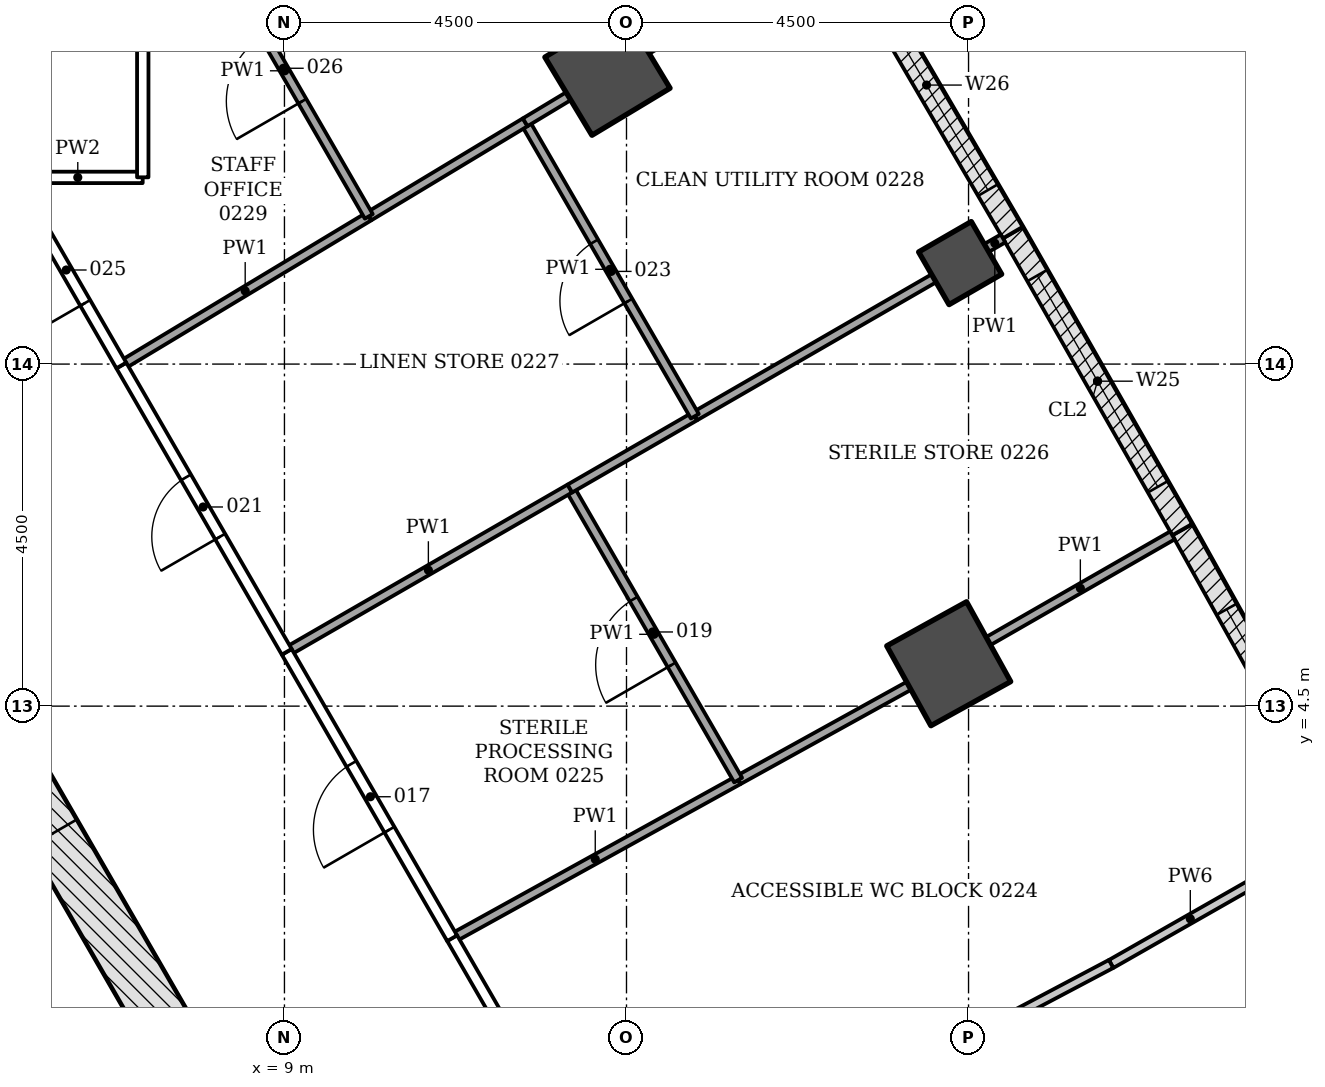
"""IFC4 building model, lengths in metres.
Left out: names, types, materials, properties, quantities, classifications, styles, units other than length and angle.
Written with IfcOpenShell. Run it as: python <this file> out.ifc"""

import sys

from ifc_helpers import new_model, si_unit, direction, frame, frame_2d, origin, origin_2d, place, context, subcontext, project, spatial, rectangle, extrude, element, fill, save


model = new_model("IFC4")
c1 = context("Model", 3, precision=1e-05, world=origin(), true_north=direction((0.0, 1.0)))
c2 = subcontext(c1, "Body", "Model", "MODEL_VIEW")
j1 = project(units=[si_unit("LENGTHUNIT", "METRE"), si_unit("PLANEANGLEUNIT", "RADIAN")], contexts=[c1])
p1 = place(None, origin())
s1 = spatial("IfcSite", under=j1, at=p1, CompositionType="ELEMENT")
p2 = place(p1, origin())
s2 = spatial("IfcBuilding", under=s1, at=p2, CompositionType="ELEMENT")
p3 = place(p2, frame((0.0, 0.0, 10.5)))
s3 = spatial("IfcBuildingStorey", under=s2, at=p3, CompositionType="ELEMENT", Elevation=10.5)
for number, where, z_axis, x_axis in (
    (1, (17.739, 5.058, -0.25), (0.0, 0.0, 1.0), (0.875, 0.484, 0.0)),
    (2, (13.25, 12.834, -0.25), (0.0, 0.0, 1.0), (0.857, 0.516, 0.0)),
):
    element("IfcColumn", number, at=place(p3, frame(where, z_axis=z_axis, x_axis=x_axis)), inside=s3, PredefinedType="COLUMN", context=c2, shape_type="SweptSolid", body=[
        extrude(rectangle(XDim=1.2, YDim=1.2, at=origin_2d()), origin(), (0.0, 0.0, 1.0), 4.5),
    ])
p4 = place(p3, frame((17.89, 10.329, -0.25), z_axis=(0.0, 0.0, 1.0), x_axis=(0.866025403784, 0.5, 0.0)))
e3 = element("IfcColumn", 3, at=p4, inside=s3, PredefinedType="COLUMN", context=c2, shape_type="SweptSolid", body=[
    extrude(rectangle(XDim=0.8, YDim=0.8, at=origin_2d()), origin(), (0.0, 0.0, 1.0), 4.5),
])
p5 = place(p3, frame((10.311, -4.703, -0.25), z_axis=(0.0, 0.0, 1.0), x_axis=(-0.500001446645, 0.866024568562, 0.0)))
e4 = element("IfcWall", 4, at=p5, inside=s3, PredefinedType="SHEAR", context=c2, shape_type="SweptSolid", body=[
    extrude(rectangle(XDim=18.458, YDim=0.7, at=frame_2d((9.229, 0.0))), origin(), (0.0, 0.0, 1.0), 4.5),
])
p6 = place(p5, frame((8.7, 0.0, 0.25)))
e5 = element("IfcOpeningElement", 5, at=p6, cuts=e4, PredefinedType="OPENING", context=c2, shape_type="SweptSolid", body=[
    extrude(rectangle(XDim=1.0, YDim=2.1, at=frame_2d((0.5, 1.05))), frame((0.0, 0.36, 0.0), z_axis=(0.0, -1.0, 0.0), x_axis=(1.0, 0.0, 0.0)), (0.0, 0.0, 1.0), 0.72),
])
p7 = place(p5, frame((4.002, 0.0, 0.25)))
e6 = element("IfcOpeningElement", 6, at=p7, cuts=e4, PredefinedType="OPENING", context=c2, shape_type="SweptSolid", body=[
    extrude(rectangle(XDim=0.9, YDim=2.1, at=frame_2d((0.45, 1.05))), frame((0.0, 0.36, 0.0), z_axis=(0.0, -1.0, 0.0), x_axis=(1.0, 0.0, 0.0)), (0.0, 0.0, 1.0), 0.72),
])
p8 = place(p5, frame((14.093, 0.0, 0.25)))
e7 = element("IfcOpeningElement", 7, at=p8, cuts=e4, PredefinedType="OPENING", context=c2, shape_type="SweptSolid", body=[
    extrude(rectangle(XDim=0.9, YDim=2.1, at=frame_2d((0.45, 1.05))), frame((0.0, 0.36, 0.0), z_axis=(0.0, -1.0, 0.0), x_axis=(1.0, 0.0, 0.0)), (0.0, 0.0, 1.0), 0.72),
])
p9 = place(p3, frame((20.812, 6.82, 0.0), z_axis=(0.0, 0.0, 1.0), x_axis=(0.486606252415, -0.873621402617, 0.0)))
e8 = element("IfcWall", 8, at=p9, inside=s3, PredefinedType="NOTDEFINED", context=c2, shape_type="SweptSolid", body=[
    extrude(rectangle(XDim=4.496, YDim=0.3, at=frame_2d((2.248, 0.0))), origin(), (0.0, 0.0, 1.0), 4.25),
])
p10 = place(p9, frame((1.198, 0.0, 0.8)))
e9 = element("IfcOpeningElement", 9, at=p10, cuts=e8, PredefinedType="OPENING", context=c2, shape_type="SweptSolid", body=[
    extrude(rectangle(XDim=2.1, YDim=3.0, at=frame_2d((1.05, 1.5))), frame((0.0, 0.16, 0.0), z_axis=(0.0, -1.0, 0.0), x_axis=(1.0, 0.0, 0.0)), (0.0, 0.0, 1.0), 0.32),
])
p11 = place(p3, frame((18.583, 10.728, 0.0), z_axis=(0.0, 0.0, 1.0), x_axis=(0.495524760411, -0.868593812907, 0.0)))
e10 = element("IfcWall", 10, at=p11, inside=s3, PredefinedType="NOTDEFINED", context=c2, shape_type="SweptSolid", body=[
    extrude(rectangle(XDim=4.496, YDim=0.3, at=frame_2d((2.248, 0.0))), origin(), (0.0, 0.0, 1.0), 4.25),
])
p12 = place(p11, frame((0.648, 0.0, 0.8)))
e11 = element("IfcOpeningElement", 11, at=p12, cuts=e10, PredefinedType="OPENING", context=c2, shape_type="SweptSolid", body=[
    extrude(rectangle(XDim=3.2, YDim=2.7, at=frame_2d((1.6, 1.35))), frame((0.0, 0.16, 0.0), z_axis=(0.0, -1.0, 0.0), x_axis=(1.0, 0.0, 0.0)), (0.0, 0.0, 1.0), 0.32),
])
p13 = place(p3, frame((16.314, 14.612, 0.0), z_axis=(0.0, 0.0, 1.0), x_axis=(0.50445499627, -0.86343798662, 0.0)))
e12 = element("IfcWall", 12, at=p13, inside=s3, PredefinedType="NOTDEFINED", context=c2, shape_type="SweptSolid", body=[
    extrude(rectangle(XDim=4.496, YDim=0.3, at=frame_2d((2.248, 0.0))), origin(), (0.0, 0.0, 1.0), 4.25),
])
p14 = place(p13, frame((0.648, 0.0, 0.8)))
e13 = element("IfcOpeningElement", 13, at=p14, cuts=e12, PredefinedType="OPENING", context=c2, shape_type="SweptSolid", body=[
    extrude(rectangle(XDim=3.2, YDim=2.7, at=frame_2d((1.6, 1.35))), frame((0.0, 0.16, 0.0), z_axis=(0.0, -1.0, 0.0), x_axis=(1.0, 0.0, 0.0)), (0.0, 0.0, 1.0), 0.32),
])
p15 = place(p3, frame((21.959, 2.295, 0.0), z_axis=(0.0, 0.0, 1.0), x_axis=(-0.868831589773, -0.49510773435, 0.0)))
e14 = element("IfcWall", 14, at=p15, inside=s3, PredefinedType="PARTITIONING", context=c2, shape_type="SweptSolid", body=[
    extrude(rectangle(XDim=2.397, YDim=0.12, at=frame_2d((1.199, 0.0))), origin(), (0.0, 0.0, 1.0), 3.638),
])
p16 = place(p3, frame((19.875, 1.108, 0.0), z_axis=(0.0, 0.0, 1.0), x_axis=(-0.884045895877, -0.467400100538, 0.0)))
e15 = element("IfcWall", 15, at=p16, inside=s3, PredefinedType="PARTITIONING", context=c2, shape_type="SweptSolid", body=[
    extrude(rectangle(XDim=2.439, YDim=0.12, at=frame_2d((1.219, 0.0))), origin(), (0.0, 0.0, 1.0), 3.638),
])
p17 = place(p3, frame((11.205, 1.45, 0.0), z_axis=(0.0, 0.0, 1.0), x_axis=(0.500058412813, -0.865991676505, 0.0)))
e16 = element("IfcWall", 16, at=p17, inside=s3, PredefinedType="PARTITIONING", context=c2, shape_type="SweptSolid", body=[
    extrude(rectangle(XDim=4.361, YDim=0.15, at=frame_2d((2.181, 0.0))), origin(), (0.0, 0.0, 1.0), 3.638),
])
p18 = place(p17, frame((1.65, 0.0, 0.0)))
e17 = element("IfcOpeningElement", 17, at=p18, cuts=e16, PredefinedType="OPENING", context=c2, shape_type="SweptSolid", body=[
    extrude(rectangle(XDim=1.0, YDim=2.1, at=frame_2d((0.5, 1.05))), frame((0.0, 0.085, 0.0), z_axis=(0.0, -1.0, 0.0), x_axis=(1.0, 0.0, 0.0)), (0.0, 0.0, 1.0), 0.17),
])
p19 = place(p3, frame((14.97, 3.526, 0.0), z_axis=(0.0, 0.0, 1.0), x_axis=(-0.875157368867, -0.483838381815, 0.0)))
e18 = element("IfcWall", 18, at=p19, inside=s3, PredefinedType="PARTITIONING", context=c2, shape_type="SweptSolid", body=[
    extrude(rectangle(XDim=4.299, YDim=0.12, at=frame_2d((2.149, 0.0))), origin(), (0.0, 0.0, 1.0), 3.638),
])
p20 = place(p3, frame((17.214, 4.767, 0.0), z_axis=(0.0, 0.0, 1.0), x_axis=(-0.875184225923, -0.483789800116, 0.0)))
e19 = element("IfcWall", 19, at=p20, inside=s3, PredefinedType="PARTITIONING", context=c2, shape_type="SweptSolid", body=[
    extrude(rectangle(XDim=2.563, YDim=0.12, at=frame_2d((1.281, 0.0))), origin(), (0.0, 0.0, 1.0), 3.638),
])
p21 = place(p3, frame((20.682, 6.746, 0.0), z_axis=(0.0, 0.0, 1.0), x_axis=(-0.867283853893, -0.49781393791, 0.0)))
e20 = element("IfcWall", 20, at=p21, inside=s3, PredefinedType="PARTITIONING", context=c2, shape_type="SweptSolid", body=[
    extrude(rectangle(XDim=2.792, YDim=0.12, at=frame_2d((1.396, 0.0))), origin(), (0.0, 0.0, 1.0), 3.633),
])
p22 = place(p3, frame((11.206, 1.446, 0.0), z_axis=(0.0, 0.0, 1.0), x_axis=(-0.500044734646, 0.865999574684, 0.0)))
e21 = element("IfcWall", 21, at=p22, inside=s3, PredefinedType="PARTITIONING", context=c2, shape_type="SweptSolid", body=[
    extrude(rectangle(XDim=4.35, YDim=0.15, at=frame_2d((2.175, 0.0))), origin(), (0.0, 0.0, 1.0), 3.638),
])
p23 = place(p22, frame((1.65, 0.0, 0.0)))
e22 = element("IfcOpeningElement", 22, at=p23, cuts=e21, PredefinedType="OPENING", context=c2, shape_type="SweptSolid", body=[
    extrude(rectangle(XDim=1.0, YDim=2.1, at=frame_2d((0.5, 1.05))), frame((0.0, 0.085, 0.0), z_axis=(0.0, -1.0, 0.0), x_axis=(1.0, 0.0, 0.0)), (0.0, 0.0, 1.0), 0.17),
])
p24 = place(p3, frame((9.03, 5.215, 0.0), z_axis=(0.0, 0.0, 1.0), x_axis=(-0.500239242508, 0.86588723299, 0.0)))
e23 = element("IfcWall", 23, at=p24, inside=s3, PredefinedType="PARTITIONING", context=c2, shape_type="SweptSolid", body=[
    extrude(rectangle(XDim=4.348, YDim=0.15, at=frame_2d((2.174, 0.0))), origin(), (0.0, 0.0, 1.0), 3.638),
])
p25 = place(p24, frame((1.75, 0.0, 0.0)))
e24 = element("IfcOpeningElement", 24, at=p25, cuts=e23, PredefinedType="OPENING", context=c2, shape_type="SweptSolid", body=[
    extrude(rectangle(XDim=0.9, YDim=2.1, at=frame_2d((0.45, 1.05))), frame((0.0, 0.085, 0.0), z_axis=(0.0, -1.0, 0.0), x_axis=(1.0, 0.0, 0.0)), (0.0, 0.0, 1.0), 0.17),
])
p26 = place(p3, frame((6.854, 8.982, 0.0), z_axis=(0.0, 0.0, 1.0), x_axis=(-0.499919889281, 0.866071650789, 0.0)))
e25 = element("IfcWall", 25, at=p26, inside=s3, PredefinedType="PARTITIONING", context=c2, shape_type="SweptSolid", body=[
    extrude(rectangle(XDim=2.854, YDim=0.15, at=frame_2d((1.427, 0.0))), origin(), (0.0, 0.0, 1.0), 3.638),
])
p27 = place(p26, frame((0.95, 0.0, 0.0)))
e26 = element("IfcOpeningElement", 26, at=p27, cuts=e25, PredefinedType="OPENING", context=c2, shape_type="SweptSolid", body=[
    extrude(rectangle(XDim=1.0, YDim=2.1, at=frame_2d((0.5, 1.05))), frame((0.0, 0.085, 0.0), z_axis=(0.0, -1.0, 0.0), x_axis=(1.0, 0.0, 0.0)), (0.0, 0.0, 1.0), 0.17),
])
p28 = place(p3, frame((5.427, 11.456, 0.0), z_axis=(0.0, 0.0, 1.0), x_axis=(1.0, 0.0, 0.0)))
e27 = element("IfcWall", 27, at=p28, inside=s3, PredefinedType="PARTITIONING", context=c2, shape_type="SweptSolid", body=[
    extrude(rectangle(XDim=1.708, YDim=0.15, at=frame_2d((0.854, 0.0))), origin(), (0.0, 0.0, 1.0), 4.25),
])
p29 = place(p3, frame((7.136, 11.457, 0.0), z_axis=(0.0, 0.0, 1.0), x_axis=(0.0, 1.0, 0.0)))
e28 = element("IfcWall", 28, at=p29, inside=s3, PredefinedType="PARTITIONING", context=c2, shape_type="SweptSolid", body=[
    extrude(rectangle(XDim=2.84, YDim=0.15, at=frame_2d((1.42, 0.0))), origin(), (0.0, 0.0, 1.0), 3.638),
])
p30 = place(p3, frame((14.969, 3.527, 0.0), z_axis=(0.0, 0.0, 1.0), x_axis=(-0.499903777033, 0.866080951013, 0.0)))
e29 = element("IfcWall", 29, at=p30, inside=s3, PredefinedType="PARTITIONING", context=c2, shape_type="SweptSolid", body=[
    extrude(rectangle(XDim=4.429, YDim=0.12, at=frame_2d((2.214, 0.0))), origin(), (0.0, 0.0, 1.0), 3.638),
])
p31 = place(p30, frame((1.75, 0.0, 0.0)))
e30 = element("IfcOpeningElement", 30, at=p31, cuts=e29, PredefinedType="OPENING", context=c2, shape_type="SweptSolid", body=[
    extrude(rectangle(XDim=1.0, YDim=2.1, at=frame_2d((0.5, 1.05))), frame((0.0, 0.07, 0.0), z_axis=(0.0, -1.0, 0.0), x_axis=(1.0, 0.0, 0.0)), (0.0, 0.0, 1.0), 0.14),
])
p32 = place(p3, frame((12.755, 7.363, 0.0), z_axis=(0.0, 0.0, 1.0), x_axis=(-0.866173292352, -0.499743761959, 0.0)))
e31 = element("IfcWall", 31, at=p32, inside=s3, PredefinedType="PARTITIONING", context=c2, shape_type="SweptSolid", body=[
    extrude(rectangle(XDim=4.298, YDim=0.12, at=frame_2d((2.149, 0.0))), origin(), (0.0, 0.0, 1.0), 3.638),
])
p33 = place(p3, frame((14.4, 8.313, 0.0), z_axis=(0.0, 0.0, 1.0), x_axis=(-0.865980106173, -0.500078449558, 0.0)))
e32 = element("IfcWall", 32, at=p33, inside=s3, PredefinedType="PARTITIONING", context=c2, shape_type="SweptSolid", body=[
    extrude(rectangle(XDim=1.9, YDim=0.12, at=frame_2d((0.95, 0.0))), origin(), (0.0, 0.0, 1.0), 3.638),
])
p34 = place(p3, frame((17.543, 10.128, 0.0), z_axis=(0.0, 0.0, 1.0), x_axis=(-0.866039913117, -0.499974868256, 0.0)))
e33 = element("IfcWall", 33, at=p34, inside=s3, PredefinedType="PARTITIONING", context=c2, shape_type="SweptSolid", body=[
    extrude(rectangle(XDim=3.628, YDim=0.12, at=frame_2d((1.814, 0.0))), origin(), (0.0, 0.0, 1.0), 3.638),
])
p35 = place(p3, frame((18.454, 10.653, 0.0), z_axis=(0.0, 0.0, 1.0), x_axis=(-0.866558586415, -0.499075361355, 0.0)))
e34 = element("IfcWall", 34, at=p35, inside=s3, PredefinedType="PARTITIONING", context=c2, shape_type="SweptSolid", body=[
    extrude(rectangle(XDim=0.25, YDim=0.12, at=frame_2d((0.125, 0.0))), origin(), (0.0, 0.0, 1.0), 4.25),
])
p36 = place(p3, frame((14.399, 8.314, 0.0), z_axis=(0.0, 0.0, 1.0), x_axis=(-0.49998599166, 0.866033491352, 0.0)))
e35 = element("IfcWall", 35, at=p36, inside=s3, PredefinedType="PARTITIONING", context=c2, shape_type="SweptSolid", body=[
    extrude(rectangle(XDim=4.464, YDim=0.12, at=frame_2d((2.232, 0.0))), origin(), (0.0, 0.0, 1.0), 3.638),
])
p37 = place(p36, frame((1.75, 0.0, 0.0)))
e36 = element("IfcOpeningElement", 36, at=p37, cuts=e35, PredefinedType="OPENING", context=c2, shape_type="SweptSolid", body=[
    extrude(rectangle(XDim=0.9, YDim=2.1, at=frame_2d((0.45, 1.05))), frame((0.0, 0.07, 0.0), z_axis=(0.0, -1.0, 0.0), x_axis=(1.0, 0.0, 0.0)), (0.0, 0.0, 1.0), 0.14),
])
p38 = place(p3, frame((10.111, 10.942, 0.0), z_axis=(0.0, 0.0, 1.0), x_axis=(-0.856692501001, -0.515827450539, 0.0)))
e37 = element("IfcWall", 37, at=p38, inside=s3, PredefinedType="PARTITIONING", context=c2, shape_type="SweptSolid", body=[
    extrude(rectangle(XDim=3.8, YDim=0.12, at=frame_2d((1.9, 0.0))), origin(), (0.0, 0.0, 1.0), 3.638),
])
p39 = place(p3, frame((12.167, 12.181, 0.0), z_axis=(0.0, 0.0, 1.0), x_axis=(-0.856602650019, -0.515976646739, 0.0)))
e38 = element("IfcWall", 38, at=p39, inside=s3, PredefinedType="PARTITIONING", context=c2, shape_type="SweptSolid", body=[
    extrude(rectangle(XDim=2.399, YDim=0.12, at=frame_2d((1.199, 0.0))), origin(), (0.0, 0.0, 1.0), 3.638),
])
p40 = place(p3, frame((12.736, 12.524, 0.0), z_axis=(0.0, 0.0, 1.0), x_axis=(-0.856453764076, -0.516223740252, 0.0)))
e39 = element("IfcWall", 39, at=p40, inside=s3, PredefinedType="PARTITIONING", context=c2, shape_type="SweptSolid", body=[
    extrude(rectangle(XDim=0.665, YDim=0.12, at=frame_2d((0.332, 0.0))), origin(), (0.0, 0.0, 1.0), 3.638),
])
p41 = place(p3, frame((16.183, 14.538, 0.0), z_axis=(0.0, 0.0, 1.0), x_axis=(-0.864576979504, -0.50250039454, 0.0)))
e40 = element("IfcWall", 40, at=p41, inside=s3, PredefinedType="PARTITIONING", context=c2, shape_type="SweptSolid", body=[
    extrude(rectangle(XDim=2.792, YDim=0.12, at=frame_2d((1.396, 0.0))), origin(), (0.0, 0.0, 1.0), 3.633),
])
p42 = place(p3, frame((10.11, 10.943, 0.0), z_axis=(0.0, 0.0, 1.0), x_axis=(-0.49990879683, 0.866078053556, 0.0)))
e41 = element("IfcWall", 41, at=p42, inside=s3, PredefinedType="PARTITIONING", context=c2, shape_type="SweptSolid", body=[
    extrude(rectangle(XDim=4.423, YDim=0.12, at=frame_2d((2.211, 0.0))), origin(), (0.0, 0.0, 1.0), 3.638),
])
p43 = place(p42, frame((1.75, 0.0, 0.0)))
e42 = element("IfcOpeningElement", 42, at=p43, cuts=e41, PredefinedType="OPENING", context=c2, shape_type="SweptSolid", body=[
    extrude(rectangle(XDim=1.0, YDim=2.1, at=frame_2d((0.5, 1.05))), frame((0.0, 0.07, 0.0), z_axis=(0.0, -1.0, 0.0), x_axis=(1.0, 0.0, 0.0)), (0.0, 0.0, 1.0), 0.14),
])
p44 = place(p10, origin())
e43 = element("IfcWindow", 43, at=p44, inside=s3, PartitioningType="DOUBLE_PANEL_HORIZONTAL", PredefinedType="WINDOW", context=c2, shape_type="SweptSolid", body=[
    extrude(rectangle(XDim=2.1, YDim=3.0, at=frame_2d((1.05, 1.5))), frame((0.0, 0.03, 0.0), z_axis=(0.0, -1.0, 0.0), x_axis=(1.0, 0.0, 0.0)), (0.0, 0.0, 1.0), 0.06),
])
fill(e9, e43)
p45 = place(p12, origin())
e44 = element("IfcWindow", 44, at=p45, inside=s3, PartitioningType="TRIPLE_PANEL_VERTICAL", PredefinedType="WINDOW", context=c2, shape_type="SweptSolid", body=[
    extrude(rectangle(XDim=3.2, YDim=2.7, at=frame_2d((1.6, 1.35))), frame((0.0, 0.03, 0.0), z_axis=(0.0, -1.0, 0.0), x_axis=(1.0, 0.0, 0.0)), (0.0, 0.0, 1.0), 0.06),
])
fill(e11, e44)
p46 = place(p14, origin())
e45 = element("IfcWindow", 45, at=p46, inside=s3, PartitioningType="TRIPLE_PANEL_VERTICAL", PredefinedType="WINDOW", context=c2, shape_type="SweptSolid", body=[
    extrude(rectangle(XDim=3.2, YDim=2.7, at=frame_2d((1.6, 1.35))), frame((0.0, 0.03, 0.0), z_axis=(0.0, -1.0, 0.0), x_axis=(1.0, 0.0, 0.0)), (0.0, 0.0, 1.0), 0.06),
])
fill(e13, e45)
p47 = place(p6, origin())
e46 = element("IfcDoor", 46, at=p47, inside=s3, OperationType="SINGLE_SWING_LEFT", PredefinedType="DOOR", context=c2, shape_type="SweptSolid", body=[
    extrude(rectangle(XDim=1.0, YDim=2.1, at=frame_2d((0.5, 1.05))), frame((0.0, 0.075, 0.0), z_axis=(0.0, -1.0, 0.0), x_axis=(1.0, 0.0, 0.0)), (0.0, 0.0, 1.0), 0.15),
])
fill(e5, e46)
p48 = place(p23, origin())
e47 = element("IfcDoor", 47, at=p48, inside=s3, OperationType="SINGLE_SWING_RIGHT", PredefinedType="DOOR", context=c2, shape_type="SweptSolid", body=[
    extrude(rectangle(XDim=1.0, YDim=2.1, at=frame_2d((0.5, 1.05))), frame((0.0, 0.025, 0.0), z_axis=(0.0, -1.0, 0.0), x_axis=(1.0, 0.0, 0.0)), (0.0, 0.0, 1.0), 0.05),
])
fill(e22, e47)
p49 = place(p31, origin())
e48 = element("IfcDoor", 48, at=p49, inside=s3, OperationType="SINGLE_SWING_LEFT", PredefinedType="DOOR", context=c2, shape_type="SweptSolid", body=[
    extrude(rectangle(XDim=1.0, YDim=2.1, at=frame_2d((0.5, 1.05))), frame((0.0, 0.025, 0.0), z_axis=(0.0, -1.0, 0.0), x_axis=(1.0, 0.0, 0.0)), (0.0, 0.0, 1.0), 0.05),
])
fill(e30, e48)
p50 = place(p25, origin())
e49 = element("IfcDoor", 49, at=p50, inside=s3, OperationType="SINGLE_SWING_LEFT", PredefinedType="DOOR", context=c2, shape_type="SweptSolid", body=[
    extrude(rectangle(XDim=0.9, YDim=2.1, at=frame_2d((0.45, 1.05))), frame((0.0, 0.025, 0.0), z_axis=(0.0, -1.0, 0.0), x_axis=(1.0, 0.0, 0.0)), (0.0, 0.0, 1.0), 0.05),
])
fill(e24, e49)
p51 = place(p37, origin())
e50 = element("IfcDoor", 50, at=p51, inside=s3, OperationType="SINGLE_SWING_RIGHT", PredefinedType="DOOR", context=c2, shape_type="SweptSolid", body=[
    extrude(rectangle(XDim=0.9, YDim=2.1, at=frame_2d((0.45, 1.05))), frame((0.0, 0.025, 0.0), z_axis=(0.0, -1.0, 0.0), x_axis=(1.0, 0.0, 0.0)), (0.0, 0.0, 1.0), 0.05),
])
fill(e36, e50)
p52 = place(p27, origin())
e51 = element("IfcDoor", 51, at=p52, inside=s3, OperationType="SINGLE_SWING_LEFT", PredefinedType="DOOR", context=c2, shape_type="SweptSolid", body=[
    extrude(rectangle(XDim=1.0, YDim=2.1, at=frame_2d((0.5, 1.05))), frame((0.0, 0.025, 0.0), z_axis=(0.0, -1.0, 0.0), x_axis=(1.0, 0.0, 0.0)), (0.0, 0.0, 1.0), 0.05),
])
fill(e26, e51)
p53 = place(p43, origin())
e52 = element("IfcDoor", 52, at=p53, inside=s3, OperationType="SINGLE_SWING_LEFT", PredefinedType="DOOR", context=c2, shape_type="SweptSolid", body=[
    extrude(rectangle(XDim=1.0, YDim=2.1, at=frame_2d((0.5, 1.05))), frame((0.0, 0.025, 0.0), z_axis=(0.0, -1.0, 0.0), x_axis=(1.0, 0.0, 0.0)), (0.0, 0.0, 1.0), 0.05),
])
fill(e42, e52)
save(model, sys.argv[1])
